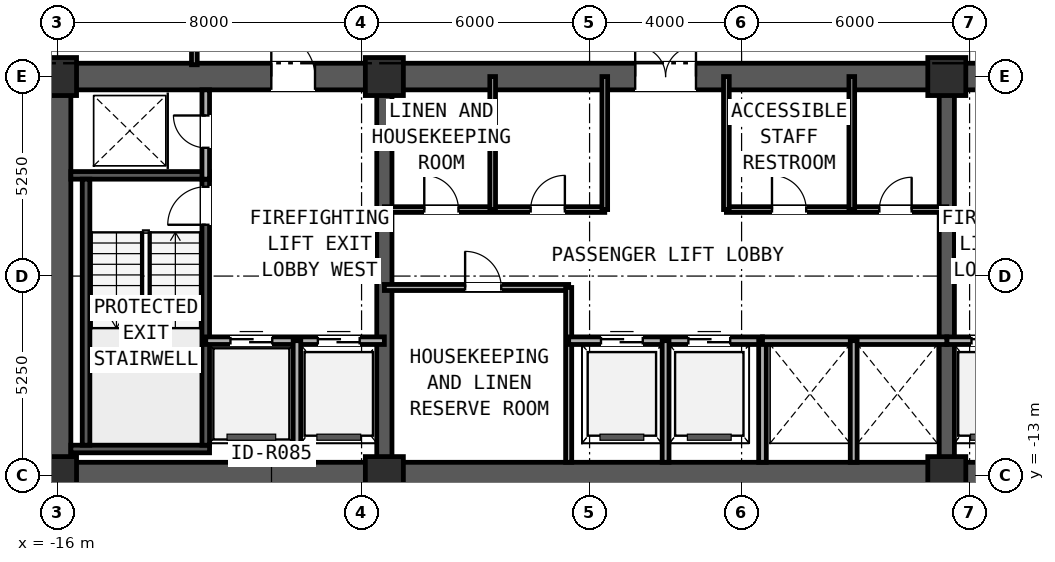
"""IFC4 building model, lengths in metres.
Left out: names, types, materials, properties, quantities, classifications, styles, units other than length and angle.
Written with IfcOpenShell. Run it as: python <this file> out.ifc"""

import sys

from ifc_helpers import new_model, si_unit, direction, frame, frame_2d, origin, origin_2d, place, context, subcontext, project, spatial, rectangle, extrude, element, fill, save


model = new_model("IFC4")
c1 = context("Model", 3, precision=1e-05, world=origin(), true_north=direction((0.0, 1.0)))
c2 = subcontext(c1, "Body", "Model", "MODEL_VIEW")
j1 = project(units=[si_unit("LENGTHUNIT", "METRE"), si_unit("PLANEANGLEUNIT", "RADIAN")], contexts=[c1])
p1 = place(None, origin())
s1 = spatial("IfcSite", under=j1, at=p1, CompositionType="ELEMENT")
p2 = place(p1, origin())
s2 = spatial("IfcBuilding", under=s1, at=p2, CompositionType="ELEMENT")
p3 = place(p2, frame((0.0, 0.0, 160.05)))
s3 = spatial("IfcBuildingStorey", under=s2, at=p3, CompositionType="ELEMENT", Elevation=160.05)
p4 = place(p3, frame((-16.35, -13.0, 0.0), z_axis=(0.0, 0.0, 1.0), x_axis=(1.0, 0.0, 0.0)))
e1 = element("IfcWall", 1, at=p4, inside=s3, PredefinedType="SHEAR", context=c2, shape_type="SweptSolid", body=[
    extrude(rectangle(XDim=32.7, YDim=0.7, at=frame_2d((16.35, 0.0))), origin(), (0.0, 0.0, 1.0), 2.91),
])
p5 = place(p3, frame((-16.35, -2.5, 0.0), z_axis=(0.0, 0.0, 1.0), x_axis=(1.0, 0.0, 0.0)))
e2 = element("IfcWall", 2, at=p5, inside=s3, PredefinedType="SHEAR", context=c2, shape_type="SweptSolid", body=[
    extrude(rectangle(XDim=32.7, YDim=0.7, at=frame_2d((16.35, 0.0))), origin(), (0.0, 0.0, 1.0), 2.91),
])
p6 = place(p5, frame((5.975, 0.0, 0.0)))
e3 = element("IfcOpeningElement", 3, at=p6, cuts=e2, PredefinedType="OPENING", context=c2, shape_type="SweptSolid", body=[
    extrude(rectangle(XDim=1.15, YDim=2.0, at=frame_2d((0.575, 1.0))), frame((0.0, 0.36, 0.0), z_axis=(0.0, -1.0, 0.0), x_axis=(1.0, 0.0, 0.0)), (0.0, 0.0, 1.0), 0.72),
])
p7 = place(p5, frame((15.55, 0.0, 0.0)))
e4 = element("IfcOpeningElement", 4, at=p7, cuts=e2, PredefinedType="OPENING", context=c2, shape_type="SweptSolid", body=[
    extrude(rectangle(XDim=1.6, YDim=2.0, at=frame_2d((0.8, 1.0))), frame((0.0, 0.36, 0.0), z_axis=(0.0, -1.0, 0.0), x_axis=(1.0, 0.0, 0.0)), (0.0, 0.0, 1.0), 0.72),
])
p8 = place(p5, frame((25.575, 0.0, 0.0)))
e5 = element("IfcOpeningElement", 5, at=p8, cuts=e2, PredefinedType="OPENING", context=c2, shape_type="SweptSolid", body=[
    extrude(rectangle(XDim=1.15, YDim=2.0, at=frame_2d((0.575, 1.0))), frame((0.0, 0.36, 0.0), z_axis=(0.0, -1.0, 0.0), x_axis=(1.0, 0.0, 0.0)), (0.0, 0.0, 1.0), 0.72),
])
p9 = place(p3, frame((-16.0, -12.65, 0.0), z_axis=(0.0, 0.0, 1.0), x_axis=(0.0, 1.0, 0.0)))
e6 = element("IfcWall", 6, at=p9, inside=s3, PredefinedType="SHEAR", context=c2, shape_type="SweptSolid", body=[
    extrude(rectangle(XDim=9.8, YDim=0.7, at=frame_2d((4.9, 0.0))), origin(), (0.0, 0.0, 1.0), 2.91),
])
for number, where, z_axis, x_axis in (
    (7, (-7.4, -12.65, 0.0), (0.0, 0.0, 1.0), (0.0, 1.0, 0.0)),
    (8, (7.4, -12.65, 0.0), (0.0, 0.0, 1.0), (0.0, 1.0, 0.0)),
):
    element("IfcWall", number, at=place(p3, frame(where, z_axis=z_axis, x_axis=x_axis)), inside=s3, PredefinedType="SHEAR", context=c2, shape_type="SweptSolid", body=[
        extrude(rectangle(XDim=9.8, YDim=0.4, at=frame_2d((4.9, 0.0))), origin(), (0.0, 0.0, 1.0), 3.19),
    ])
for number, where, z_axis, x_axis in (
    (9, (-15.65, -12.3, 0.0), (0.0, 0.0, 1.0), (1.0, 0.0, 0.0)),
    (10, (-15.65, -5.1, 0.0), (0.0, 0.0, 1.0), (1.0, 0.0, 0.0)),
):
    element("IfcWall", number, at=place(p3, frame(where, z_axis=z_axis, x_axis=x_axis)), inside=s3, PredefinedType="SOLIDWALL", context=c2, shape_type="SweptSolid", body=[
        extrude(rectangle(XDim=3.65, YDim=0.2, at=frame_2d((1.825, 0.0))), origin(), (0.0, 0.0, 1.0), 3.19),
    ])
p10 = place(p3, frame((-15.25, -12.2, 0.0), z_axis=(0.0, 0.0, 1.0), x_axis=(0.0, 1.0, 0.0)))
e11 = element("IfcWall", 11, at=p10, inside=s3, PredefinedType="SOLIDWALL", context=c2, shape_type="SweptSolid", body=[
    extrude(rectangle(XDim=7.0, YDim=0.2, at=frame_2d((3.5, 0.0))), origin(), (0.0, 0.0, 1.0), 3.19),
])
p11 = place(p3, frame((-12.1, -12.2, 0.0), z_axis=(0.0, 0.0, 1.0), x_axis=(0.0, 1.0, 0.0)))
e12 = element("IfcWall", 12, at=p11, inside=s3, PredefinedType="SOLIDWALL", context=c2, shape_type="SweptSolid", body=[
    extrude(rectangle(XDim=7.0, YDim=0.2, at=frame_2d((3.5, 0.0))), origin(), (0.0, 0.0, 1.0), 3.19),
])
p12 = place(p11, frame((5.8, 0.0, 0.0)))
e13 = element("IfcOpeningElement", 13, at=p12, cuts=e12, PredefinedType="OPENING", context=c2, shape_type="SweptSolid", body=[
    extrude(rectangle(XDim=1.0, YDim=2.1, at=frame_2d((0.5, 1.05))), frame((0.0, 0.11, 0.0), z_axis=(0.0, -1.0, 0.0), x_axis=(1.0, 0.0, 0.0)), (0.0, 0.0, 1.0), 0.22),
])
for number, where, z_axis, x_axis in (
    (14, (-16.0, -13.0, 0.0), (0.0, 0.0, 1.0), (1.0, 0.0, 0.0)),
    (15, (-7.4, -13.0, 0.0), (0.0, 0.0, 1.0), (1.0, 0.0, 0.0)),
    (16, (7.4, -13.0, 0.0), (0.0, 0.0, 1.0), (1.0, 0.0, 0.0)),
    (17, (-16.0, -2.5, 0.0), (0.0, 0.0, 1.0), (1.0, 0.0, 0.0)),
    (18, (-7.4, -2.5, 0.0), (0.0, 0.0, 1.0), (1.0, 0.0, 0.0)),
    (19, (7.4, -2.5, 0.0), (0.0, 0.0, 1.0), (1.0, 0.0, 0.0)),
):
    element("IfcColumn", number, at=place(p3, frame(where, z_axis=z_axis, x_axis=x_axis)), inside=s3, PredefinedType="COLUMN", context=c2, shape_type="SweptSolid", body=[
        extrude(rectangle(XDim=1.0, YDim=1.0, at=origin_2d()), origin(), (0.0, 0.0, 1.0), 3.45),
    ])
p13 = place(p3, frame((-26.695, -13.016, 0.0), z_axis=(0.0, 0.0, 1.0), x_axis=(0.995396268366, -0.095845025554, 0.0)))
e20 = element("IfcWall", 20, at=p13, inside=s3, PredefinedType="STANDARD", context=c2, shape_type="SweptSolid", body=[
    extrude(rectangle(XDim=49.6, YDim=0.24, at=frame_2d((24.8, 0.0))), origin(), (0.0, 0.0, 1.0), 3.19),
])
p14 = place(p13, frame((6.044, 0.0, 0.7)))
e21 = element("IfcOpeningElement", 21, at=p14, cuts=e20, PredefinedType="OPENING", context=c2, shape_type="SweptSolid", body=[
    extrude(rectangle(XDim=1.8, YDim=1.5, at=frame_2d((0.9, 0.75))), frame((0.0, 0.13, 0.0), z_axis=(0.0, -1.0, 0.0), x_axis=(1.0, 0.0, 0.0)), (0.0, 0.0, 1.0), 0.26),
])
p15 = place(p13, frame((41.756, 0.0, 0.7)))
e22 = element("IfcOpeningElement", 22, at=p15, cuts=e20, PredefinedType="OPENING", context=c2, shape_type="SweptSolid", body=[
    extrude(rectangle(XDim=1.8, YDim=1.5, at=frame_2d((0.9, 0.75))), frame((0.0, 0.13, 0.0), z_axis=(0.0, -1.0, 0.0), x_axis=(1.0, 0.0, 0.0)), (0.0, 0.0, 1.0), 0.26),
])
p16 = place(p3, frame((-12.1, -5.2, 0.0), z_axis=(0.0, 0.0, 1.0), x_axis=(0.0, 1.0, 0.0)))
e23 = element("IfcWall", 23, at=p16, inside=s3, PredefinedType="PARTITIONING", context=c2, shape_type="SweptSolid", body=[
    extrude(rectangle(XDim=2.35, YDim=0.2, at=frame_2d((1.175, 0.0))), origin(), (0.0, 0.0, 1.0), 2.225),
])
p17 = place(p16, frame((0.825, 0.0, 0.0)))
e24 = element("IfcOpeningElement", 24, at=p17, cuts=e23, PredefinedType="OPENING", context=c2, shape_type="SweptSolid", body=[
    extrude(rectangle(XDim=0.85, YDim=2.05, at=frame_2d((0.425, 1.025))), frame((0.0, 0.11, 0.0), z_axis=(0.0, -1.0, 0.0), x_axis=(1.0, 0.0, 0.0)), (0.0, 0.0, 1.0), 0.22),
])
p18 = place(p3, frame((-12.1, -9.45, 0.0), z_axis=(0.0, 0.0, 1.0), x_axis=(1.0, 0.0, 0.0)))
e25 = element("IfcWall", 25, at=p18, inside=s3, PredefinedType="PARTITIONING", context=c2, shape_type="SweptSolid", body=[
    extrude(rectangle(XDim=4.7, YDim=0.2, at=frame_2d((2.35, 0.0))), origin(), (0.0, 0.0, 1.0), 3.19),
])
p19 = place(p18, frame((0.65, 0.0, 0.0)))
e26 = element("IfcOpeningElement", 26, at=p19, cuts=e25, PredefinedType="OPENING", context=c2, shape_type="SweptSolid", body=[
    extrude(rectangle(XDim=1.1, YDim=2.2, at=frame_2d((0.55, 1.1))), frame((0.0, 0.11, 0.0), z_axis=(0.0, -1.0, 0.0), x_axis=(1.0, 0.0, 0.0)), (0.0, 0.0, 1.0), 0.22),
])
p20 = place(p18, frame((2.95, 0.0, 0.0)))
e27 = element("IfcOpeningElement", 27, at=p20, cuts=e25, PredefinedType="OPENING", context=c2, shape_type="SweptSolid", body=[
    extrude(rectangle(XDim=1.1, YDim=2.2, at=frame_2d((0.55, 1.1))), frame((0.0, 0.11, 0.0), z_axis=(0.0, -1.0, 0.0), x_axis=(1.0, 0.0, 0.0)), (0.0, 0.0, 1.0), 0.22),
])
p21 = place(p3, frame((-9.7, -12.65, 0.0), z_axis=(0.0, 0.0, 1.0), x_axis=(0.0, 1.0, 0.0)))
e28 = element("IfcWall", 28, at=p21, inside=s3, PredefinedType="PARTITIONING", context=c2, shape_type="SweptSolid", body=[
    extrude(rectangle(XDim=3.2, YDim=0.2, at=frame_2d((1.6, 0.0))), origin(), (0.0, 0.0, 1.0), 2.225),
])
p22 = place(p3, frame((7.4, -9.45, 0.0), z_axis=(0.0, 0.0, 1.0), x_axis=(1.0, 0.0, 0.0)))
e29 = element("IfcWall", 29, at=p22, inside=s3, PredefinedType="PARTITIONING", context=c2, shape_type="SweptSolid", body=[
    extrude(rectangle(XDim=4.7, YDim=0.2, at=frame_2d((2.35, 0.0))), origin(), (0.0, 0.0, 1.0), 3.19),
])
p23 = place(p22, frame((2.95, 0.0, 0.0)))
e30 = element("IfcOpeningElement", 30, at=p23, cuts=e29, PredefinedType="OPENING", context=c2, shape_type="SweptSolid", body=[
    extrude(rectangle(XDim=1.1, YDim=2.2, at=frame_2d((0.55, 1.1))), frame((0.0, 0.11, 0.0), z_axis=(0.0, -1.0, 0.0), x_axis=(1.0, 0.0, 0.0)), (0.0, 0.0, 1.0), 0.22),
])
p24 = place(p22, frame((0.65, 0.0, 0.0)))
e31 = element("IfcOpeningElement", 31, at=p24, cuts=e29, PredefinedType="OPENING", context=c2, shape_type="SweptSolid", body=[
    extrude(rectangle(XDim=1.1, YDim=2.2, at=frame_2d((0.55, 1.1))), frame((0.0, 0.11, 0.0), z_axis=(0.0, -1.0, 0.0), x_axis=(1.0, 0.0, 0.0)), (0.0, 0.0, 1.0), 0.22),
])
p25 = place(p3, frame((-7.4, -8.05, 0.0), z_axis=(0.0, 0.0, 1.0), x_axis=(1.0, 0.0, 0.0)))
e32 = element("IfcWall", 32, at=p25, inside=s3, PredefinedType="PARTITIONING", context=c2, shape_type="SweptSolid", body=[
    extrude(rectangle(XDim=4.85, YDim=0.16, at=frame_2d((2.425, 0.0))), origin(), (0.0, 0.0, 1.0), 3.19),
])
p26 = place(p25, frame((2.125, 0.0, 0.0)))
e33 = element("IfcOpeningElement", 33, at=p26, cuts=e32, PredefinedType="OPENING", context=c2, shape_type="SweptSolid", body=[
    extrude(rectangle(XDim=0.95, YDim=2.15, at=frame_2d((0.475, 1.075))), frame((0.0, 0.09, 0.0), z_axis=(0.0, -1.0, 0.0), x_axis=(1.0, 0.0, 0.0)), (0.0, 0.0, 1.0), 0.18),
])
p27 = place(p3, frame((-2.55, -12.65, 0.0), z_axis=(0.0, 0.0, 1.0), x_axis=(0.0, 1.0, 0.0)))
e34 = element("IfcWall", 34, at=p27, inside=s3, PredefinedType="PARTITIONING", context=c2, shape_type="SweptSolid", body=[
    extrude(rectangle(XDim=4.6, YDim=0.16, at=frame_2d((2.3, 0.0))), origin(), (0.0, 0.0, 1.0), 2.225),
])
p28 = place(p3, frame((-2.55, -9.45, 0.0), z_axis=(0.0, 0.0, 1.0), x_axis=(1.0, 0.0, 0.0)))
e35 = element("IfcWall", 35, at=p28, inside=s3, PredefinedType="PARTITIONING", context=c2, shape_type="SweptSolid", body=[
    extrude(rectangle(XDim=5.1, YDim=0.2, at=frame_2d((2.55, 0.0))), origin(), (0.0, 0.0, 1.0), 3.19),
])
p29 = place(p28, frame((0.85, 0.0, 0.0)))
e36 = element("IfcOpeningElement", 36, at=p29, cuts=e35, PredefinedType="OPENING", context=c2, shape_type="SweptSolid", body=[
    extrude(rectangle(XDim=1.1, YDim=2.2, at=frame_2d((0.55, 1.1))), frame((0.0, 0.11, 0.0), z_axis=(0.0, -1.0, 0.0), x_axis=(1.0, 0.0, 0.0)), (0.0, 0.0, 1.0), 0.22),
])
p30 = place(p28, frame((3.15, 0.0, 0.0)))
e37 = element("IfcOpeningElement", 37, at=p30, cuts=e35, PredefinedType="OPENING", context=c2, shape_type="SweptSolid", body=[
    extrude(rectangle(XDim=1.1, YDim=2.2, at=frame_2d((0.55, 1.1))), frame((0.0, 0.11, 0.0), z_axis=(0.0, -1.0, 0.0), x_axis=(1.0, 0.0, 0.0)), (0.0, 0.0, 1.0), 0.22),
])
p31 = place(p3, frame((0.0, -12.65, 0.0), z_axis=(0.0, 0.0, 1.0), x_axis=(0.0, 1.0, 0.0)))
e38 = element("IfcWall", 38, at=p31, inside=s3, PredefinedType="PARTITIONING", context=c2, shape_type="SweptSolid", body=[
    extrude(rectangle(XDim=3.2, YDim=0.18, at=frame_2d((1.6, 0.0))), origin(), (0.0, 0.0, 1.0), 2.225),
])
p32 = place(p3, frame((2.55, -12.65, 0.0), z_axis=(0.0, 0.0, 1.0), x_axis=(0.0, 1.0, 0.0)))
e39 = element("IfcWall", 39, at=p32, inside=s3, PredefinedType="PARTITIONING", context=c2, shape_type="SweptSolid", body=[
    extrude(rectangle(XDim=3.2, YDim=0.2, at=frame_2d((1.6, 0.0))), origin(), (0.0, 0.0, 1.0), 2.225),
])
p33 = place(p3, frame((2.55, -9.45, 0.0), z_axis=(0.0, 0.0, 1.0), x_axis=(1.0, 0.0, 0.0)))
e40 = element("IfcWall", 40, at=p33, inside=s3, PredefinedType="PARTITIONING", context=c2, shape_type="SweptSolid", body=[
    extrude(rectangle(XDim=4.85, YDim=0.2, at=frame_2d((2.425, 0.0))), origin(), (0.0, 0.0, 1.0), 3.19),
])
p34 = place(p3, frame((4.95, -12.65, 0.0), z_axis=(0.0, 0.0, 1.0), x_axis=(0.0, 1.0, 0.0)))
e41 = element("IfcWall", 41, at=p34, inside=s3, PredefinedType="PARTITIONING", context=c2, shape_type="SweptSolid", body=[
    extrude(rectangle(XDim=3.2, YDim=0.18, at=frame_2d((1.6, 0.0))), origin(), (0.0, 0.0, 1.0), 2.225),
])
p35 = place(p3, frame((-7.4, -6.0, 0.0), z_axis=(0.0, 0.0, 1.0), x_axis=(1.0, 0.0, 0.0)))
e42 = element("IfcWall", 42, at=p35, inside=s3, PredefinedType="PARTITIONING", context=c2, shape_type="SweptSolid", body=[
    extrude(rectangle(XDim=5.8, YDim=0.15, at=frame_2d((2.9, 0.0))), origin(), (0.0, 0.0, 1.0), 3.19),
])
p36 = place(p35, frame((1.05, 0.0, 0.0)))
e43 = element("IfcOpeningElement", 43, at=p36, cuts=e42, PredefinedType="OPENING", context=c2, shape_type="SweptSolid", body=[
    extrude(rectangle(XDim=0.9, YDim=2.1, at=frame_2d((0.45, 1.05))), frame((0.0, 0.085, 0.0), z_axis=(0.0, -1.0, 0.0), x_axis=(1.0, 0.0, 0.0)), (0.0, 0.0, 1.0), 0.17),
])
p37 = place(p35, frame((3.85, 0.0, 0.0)))
e44 = element("IfcOpeningElement", 44, at=p37, cuts=e42, PredefinedType="OPENING", context=c2, shape_type="SweptSolid", body=[
    extrude(rectangle(XDim=0.9, YDim=2.1, at=frame_2d((0.45, 1.05))), frame((0.0, 0.085, 0.0), z_axis=(0.0, -1.0, 0.0), x_axis=(1.0, 0.0, 0.0)), (0.0, 0.0, 1.0), 0.17),
])
p38 = place(p3, frame((-1.6, -6.0, 0.0), z_axis=(0.0, 0.0, 1.0), x_axis=(0.0, 1.0, 0.0)))
e45 = element("IfcWall", 45, at=p38, inside=s3, PredefinedType="PARTITIONING", context=c2, shape_type="SweptSolid", body=[
    extrude(rectangle(XDim=3.5, YDim=0.15, at=frame_2d((1.75, 0.0))), origin(), (0.0, 0.0, 1.0), 2.225),
])
p39 = place(p3, frame((1.6, -6.0, 0.0), z_axis=(0.0, 0.0, 1.0), x_axis=(1.0, 0.0, 0.0)))
e46 = element("IfcWall", 46, at=p39, inside=s3, PredefinedType="PARTITIONING", context=c2, shape_type="SweptSolid", body=[
    extrude(rectangle(XDim=5.8, YDim=0.15, at=frame_2d((2.9, 0.0))), origin(), (0.0, 0.0, 1.0), 3.19),
])
p40 = place(p39, frame((1.2, 0.0, 0.0)))
e47 = element("IfcOpeningElement", 47, at=p40, cuts=e46, PredefinedType="OPENING", context=c2, shape_type="SweptSolid", body=[
    extrude(rectangle(XDim=0.9, YDim=2.1, at=frame_2d((0.45, 1.05))), frame((0.0, 0.085, 0.0), z_axis=(0.0, -1.0, 0.0), x_axis=(1.0, 0.0, 0.0)), (0.0, 0.0, 1.0), 0.17),
])
p41 = place(p39, frame((4.025, 0.0, 0.0)))
e48 = element("IfcOpeningElement", 48, at=p41, cuts=e46, PredefinedType="OPENING", context=c2, shape_type="SweptSolid", body=[
    extrude(rectangle(XDim=0.85, YDim=2.05, at=frame_2d((0.425, 1.025))), frame((0.0, 0.085, 0.0), z_axis=(0.0, -1.0, 0.0), x_axis=(1.0, 0.0, 0.0)), (0.0, 0.0, 1.0), 0.17),
])
for number, where, z_axis, x_axis in (
    (49, (1.6, -6.0, 0.0), (0.0, 0.0, 1.0), (0.0, 1.0, 0.0)),
    (50, (-4.55, -6.0, 0.0), (0.0, 0.0, 1.0), (0.0, 1.0, 0.0)),
    (51, (4.9, -6.0, 0.0), (0.0, 0.0, 1.0), (0.0, 1.0, 0.0)),
):
    element("IfcWall", number, at=place(p3, frame(where, z_axis=z_axis, x_axis=x_axis)), inside=s3, PredefinedType="PARTITIONING", context=c2, shape_type="SweptSolid", body=[
        extrude(rectangle(XDim=3.5, YDim=0.15, at=frame_2d((1.75, 0.0))), origin(), (0.0, 0.0, 1.0), 2.225),
    ])
p42 = place(p3, frame((-12.4, -2.19, 0.0), z_axis=(0.0, 0.0, 1.0), x_axis=(0.0, 1.0, 0.0)))
e52 = element("IfcWall", 52, at=p42, inside=s3, PredefinedType="PARTITIONING", context=c2, shape_type="SweptSolid", body=[
    extrude(rectangle(XDim=2.78, YDim=0.15, at=frame_2d((1.39, 0.0))), origin(), (0.0, 0.0, 1.0), 2.225),
])
p43 = place(p3, frame((-16.847, -3.468, 0.0), z_axis=(0.0, 0.0, 1.0), x_axis=(0.095854804219, 0.995395326746, 0.0)))
e53 = element("IfcWall", 53, at=p43, inside=s3, PredefinedType="PARTITIONING", context=c2, shape_type="SweptSolid", body=[
    extrude(rectangle(XDim=10.356, YDim=0.16, at=frame_2d((5.178, 0.0))), origin(), (0.0, 0.0, 1.0), 2.479),
])
p44 = place(p12, frame((1.0, 0.0, 0.0), z_axis=(0.0, 0.0, 1.0), x_axis=(-1.0, 0.0, 0.0)))
e54 = element("IfcDoor", 54, at=p44, inside=s3, OperationType="SINGLE_SWING_LEFT", PredefinedType="DOOR", context=c2, shape_type="SweptSolid", body=[
    extrude(rectangle(XDim=1.0, YDim=2.1, at=frame_2d((0.5, 1.05))), frame((0.0, 0.025, 0.0), z_axis=(0.0, -1.0, 0.0), x_axis=(1.0, 0.0, 0.0)), (0.0, 0.0, 1.0), 0.05),
])
fill(e13, e54)
p45 = place(p17, origin())
e55 = element("IfcDoor", 55, at=p45, inside=s3, OperationType="SINGLE_SWING_RIGHT", PredefinedType="DOOR", context=c2, shape_type="SweptSolid", body=[
    extrude(rectangle(XDim=0.85, YDim=2.05, at=frame_2d((0.425, 1.025))), frame((0.0, 0.025, 0.0), z_axis=(0.0, -1.0, 0.0), x_axis=(1.0, 0.0, 0.0)), (0.0, 0.0, 1.0), 0.05),
])
fill(e24, e55)
p46 = place(p19, origin())
e56 = element("IfcDoor", 56, at=p46, inside=s3, OperationType="SLIDING_TO_LEFT", PredefinedType="DOOR", context=c2, shape_type="SweptSolid", body=[
    extrude(rectangle(XDim=1.1, YDim=2.2, at=frame_2d((0.55, 1.1))), frame((0.0, 0.025, 0.0), z_axis=(0.0, -1.0, 0.0), x_axis=(1.0, 0.0, 0.0)), (0.0, 0.0, 1.0), 0.05),
])
fill(e26, e56)
p47 = place(p20, origin())
e57 = element("IfcDoor", 57, at=p47, inside=s3, OperationType="SLIDING_TO_RIGHT", PredefinedType="DOOR", context=c2, shape_type="SweptSolid", body=[
    extrude(rectangle(XDim=1.1, YDim=2.2, at=frame_2d((0.55, 1.1))), frame((0.0, 0.025, 0.0), z_axis=(0.0, -1.0, 0.0), x_axis=(1.0, 0.0, 0.0)), (0.0, 0.0, 1.0), 0.05),
])
fill(e27, e57)
p48 = place(p24, origin())
e58 = element("IfcDoor", 58, at=p48, inside=s3, OperationType="SLIDING_TO_RIGHT", PredefinedType="DOOR", context=c2, shape_type="SweptSolid", body=[
    extrude(rectangle(XDim=1.1, YDim=2.2, at=frame_2d((0.55, 1.1))), frame((0.0, 0.025, 0.0), z_axis=(0.0, -1.0, 0.0), x_axis=(1.0, 0.0, 0.0)), (0.0, 0.0, 1.0), 0.05),
])
fill(e31, e58)
p49 = place(p6, origin())
e59 = element("IfcDoor", 59, at=p49, inside=s3, OperationType="SINGLE_SWING_LEFT", PredefinedType="DOOR", context=c2, shape_type="SweptSolid", body=[
    extrude(rectangle(XDim=1.15, YDim=2.0, at=frame_2d((0.575, 1.0))), frame((0.0, 0.025, 0.0), z_axis=(0.0, -1.0, 0.0), x_axis=(1.0, 0.0, 0.0)), (0.0, 0.0, 1.0), 0.05),
])
fill(e3, e59)
p50 = place(p7, origin())
e60 = element("IfcDoor", 60, at=p50, inside=s3, OperationType="DOUBLE_DOOR_SINGLE_SWING", PredefinedType="DOOR", context=c2, shape_type="SweptSolid", body=[
    extrude(rectangle(XDim=1.6, YDim=2.0, at=frame_2d((0.8, 1.0))), frame((0.0, 0.025, 0.0), z_axis=(0.0, -1.0, 0.0), x_axis=(1.0, 0.0, 0.0)), (0.0, 0.0, 1.0), 0.05),
])
fill(e4, e60)
p51 = place(p26, origin())
e61 = element("IfcDoor", 61, at=p51, inside=s3, OperationType="SINGLE_SWING_LEFT", PredefinedType="DOOR", context=c2, shape_type="SweptSolid", body=[
    extrude(rectangle(XDim=0.95, YDim=2.15, at=frame_2d((0.475, 1.075))), frame((0.0, 0.025, 0.0), z_axis=(0.0, -1.0, 0.0), x_axis=(1.0, 0.0, 0.0)), (0.0, 0.0, 1.0), 0.05),
])
fill(e33, e61)
p52 = place(p29, origin())
e62 = element("IfcDoor", 62, at=p52, inside=s3, OperationType="SLIDING_TO_RIGHT", PredefinedType="DOOR", context=c2, shape_type="SweptSolid", body=[
    extrude(rectangle(XDim=1.1, YDim=2.2, at=frame_2d((0.55, 1.1))), frame((0.0, 0.025, 0.0), z_axis=(0.0, -1.0, 0.0), x_axis=(1.0, 0.0, 0.0)), (0.0, 0.0, 1.0), 0.05),
])
fill(e36, e62)
p53 = place(p30, origin())
e63 = element("IfcDoor", 63, at=p53, inside=s3, OperationType="SLIDING_TO_RIGHT", PredefinedType="DOOR", context=c2, shape_type="SweptSolid", body=[
    extrude(rectangle(XDim=1.1, YDim=2.2, at=frame_2d((0.55, 1.1))), frame((0.0, 0.025, 0.0), z_axis=(0.0, -1.0, 0.0), x_axis=(1.0, 0.0, 0.0)), (0.0, 0.0, 1.0), 0.05),
])
fill(e37, e63)
p54 = place(p36, frame((0.9, 0.0, 0.0), z_axis=(0.0, 0.0, 1.0), x_axis=(-1.0, 0.0, 0.0)))
e64 = element("IfcDoor", 64, at=p54, inside=s3, OperationType="SINGLE_SWING_LEFT", PredefinedType="DOOR", context=c2, shape_type="SweptSolid", body=[
    extrude(rectangle(XDim=0.9, YDim=2.1, at=frame_2d((0.45, 1.05))), frame((0.0, 0.025, 0.0), z_axis=(0.0, -1.0, 0.0), x_axis=(1.0, 0.0, 0.0)), (0.0, 0.0, 1.0), 0.05),
])
fill(e43, e64)
p55 = place(p37, frame((0.9, 0.0, 0.0), z_axis=(0.0, 0.0, 1.0), x_axis=(-1.0, 0.0, 0.0)))
e65 = element("IfcDoor", 65, at=p55, inside=s3, OperationType="SINGLE_SWING_RIGHT", PredefinedType="DOOR", context=c2, shape_type="SweptSolid", body=[
    extrude(rectangle(XDim=0.9, YDim=2.1, at=frame_2d((0.45, 1.05))), frame((0.0, 0.025, 0.0), z_axis=(0.0, -1.0, 0.0), x_axis=(1.0, 0.0, 0.0)), (0.0, 0.0, 1.0), 0.05),
])
fill(e44, e65)
p56 = place(p40, frame((0.9, 0.0, 0.0), z_axis=(0.0, 0.0, 1.0), x_axis=(-1.0, 0.0, 0.0)))
e66 = element("IfcDoor", 66, at=p56, inside=s3, OperationType="SINGLE_SWING_LEFT", PredefinedType="DOOR", context=c2, shape_type="SweptSolid", body=[
    extrude(rectangle(XDim=0.9, YDim=2.1, at=frame_2d((0.45, 1.05))), frame((0.0, 0.025, 0.0), z_axis=(0.0, -1.0, 0.0), x_axis=(1.0, 0.0, 0.0)), (0.0, 0.0, 1.0), 0.05),
])
fill(e47, e66)
p57 = place(p41, frame((0.85, 0.0, 0.0), z_axis=(0.0, 0.0, 1.0), x_axis=(-1.0, 0.0, 0.0)))
e67 = element("IfcDoor", 67, at=p57, inside=s3, OperationType="SINGLE_SWING_RIGHT", PredefinedType="DOOR", context=c2, shape_type="SweptSolid", body=[
    extrude(rectangle(XDim=0.85, YDim=2.05, at=frame_2d((0.425, 1.025))), frame((0.0, 0.025, 0.0), z_axis=(0.0, -1.0, 0.0), x_axis=(1.0, 0.0, 0.0)), (0.0, 0.0, 1.0), 0.05),
])
fill(e48, e67)
save(model, sys.argv[1])
